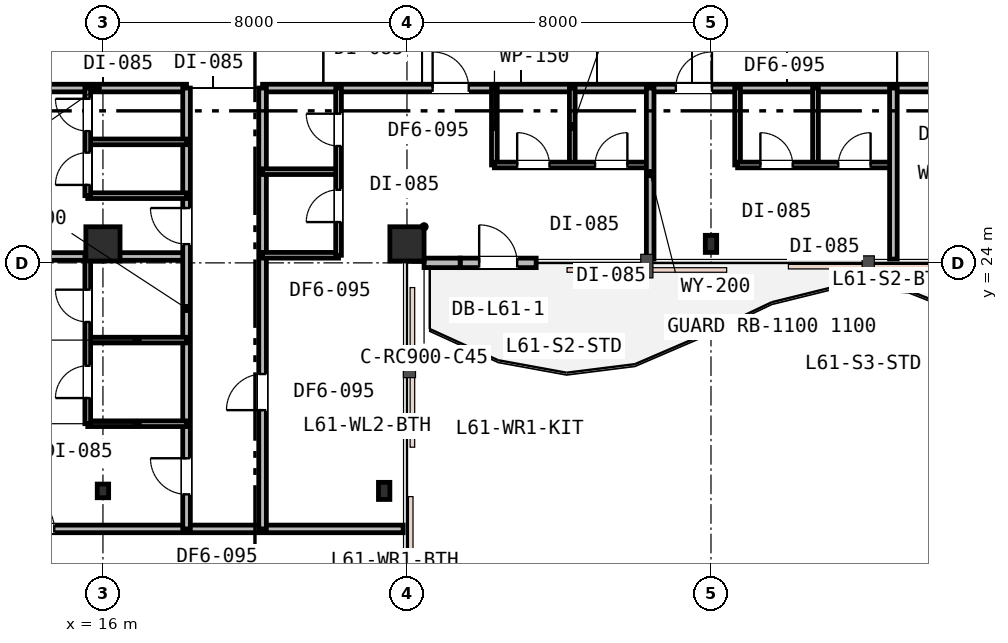
"""IFC4 building model, lengths in metres.
Left out: names, types, materials, properties, quantities, classifications, styles, units other than length and angle.
Written with IfcOpenShell. Run it as: python <this file> out.ifc"""

import sys

from ifc_helpers import new_model, si_unit, direction, frame, frame_2d, origin, origin_2d, place, context, subcontext, project, spatial, rectangle, i_section, extrude, element, fill, save


model = new_model("IFC4")
c1 = context("Model", 3, precision=1e-05, world=origin(), true_north=direction((0.0, 1.0)))
c2 = subcontext(c1, "Body", "Model", "MODEL_VIEW")
j1 = project(units=[si_unit("LENGTHUNIT", "METRE"), si_unit("PLANEANGLEUNIT", "RADIAN")], contexts=[c1])
p1 = place(None, origin())
s1 = spatial("IfcSite", under=j1, at=p1, CompositionType="ELEMENT")
p2 = place(p1, origin())
s2 = spatial("IfcBuilding", under=s1, at=p2, CompositionType="ELEMENT")
p3 = place(p2, frame((0.0, 0.0, 237.4)))
s3 = spatial("IfcBuildingStorey", under=s2, at=p3, CompositionType="ELEMENT", Elevation=237.4)
for number, where, z_axis, x_axis in (
    (1, (16.0, 24.5, 0.0), (0.0, 0.0, 1.0), (1.0, 0.0, 0.0)),
    (2, (24.0, 24.5, 0.0), (0.0, 0.0, 1.0), (1.0, 0.0, 0.0)),
):
    element("IfcColumn", number, at=place(p3, frame(where, z_axis=z_axis, x_axis=x_axis)), inside=s3, PredefinedType="COLUMN", context=c2, shape_type="SweptSolid", body=[
        extrude(rectangle(XDim=0.9, YDim=0.9, at=origin_2d()), origin(), (0.0, 0.0, 1.0), 3.8),
    ])
for number, where, z_axis, x_axis in (
    (3, (32.0, 24.5, 0.0), (0.0, 0.0, 1.0), (1.0, 0.0, 0.0)),
    (4, (23.4, 18.0, 0.0), (0.0, 0.0, 1.0), (1.0, 0.0, 0.0)),
):
    element("IfcColumn", number, at=place(p3, frame(where, z_axis=z_axis, x_axis=x_axis)), inside=s3, PredefinedType="COLUMN", context=c2, shape_type="SweptSolid", body=[
        extrude(i_section(OverallWidth=0.3, OverallDepth=0.45, WebThickness=0.014, FlangeThickness=0.026, FilletRadius=0.027, at=origin_2d()), origin(), (0.0, 0.0, 1.0), 3.8),
    ])
p4 = place(p3, frame((16.0, 18.0, 0.0), z_axis=(0.0, 0.0, 1.0), x_axis=(1.0, 0.0, 0.0)))
e5 = element("IfcColumn", 5, at=p4, inside=s3, PredefinedType="COLUMN", context=c2, shape_type="SweptSolid", body=[
    extrude(i_section(OverallWidth=0.3, OverallDepth=0.36, WebThickness=0.013, FlangeThickness=0.022, FilletRadius=0.027, at=origin_2d()), origin(), (0.0, 0.0, 1.0), 3.8),
])
p5 = place(p3, frame((25.4, 24.0, 0.0), z_axis=(0.0, 0.0, 1.0), x_axis=(1.0, 0.0, 0.0)))
e6 = element("IfcWall", 6, at=p5, inside=s3, PredefinedType="STANDARD", context=c2, shape_type="SweptSolid", body=[
    extrude(rectangle(XDim=2.0, YDim=0.25, at=frame_2d((1.0, 0.0))), origin(), (0.0, 0.0, 1.0), 3.24),
])
p6 = place(p5, frame((0.5, 0.0, 0.0)))
e7 = element("IfcOpeningElement", 7, at=p6, cuts=e6, PredefinedType="OPENING", context=c2, shape_type="SweptSolid", body=[
    extrude(rectangle(XDim=1.0, YDim=2.15, at=frame_2d((0.5, 1.075))), frame((0.0, 0.135, 0.0), z_axis=(0.0, -1.0, 0.0), x_axis=(1.0, 0.0, 0.0)), (0.0, 0.0, 1.0), 0.27),
])
p7 = place(p3, frame((24.45, 24.0, 0.0), z_axis=(0.0, 0.0, 1.0), x_axis=(1.0, 0.0, 0.0)))
e8 = element("IfcWall", 8, at=p7, inside=s3, PredefinedType="STANDARD", context=c2, shape_type="SweptSolid", body=[
    extrude(rectangle(XDim=0.95, YDim=0.25, at=frame_2d((0.475, 0.0))), origin(), (0.0, 0.0, 1.0), 3.24),
])
p8 = place(p3, frame((13.5, 28.6, 0.0), z_axis=(0.0, 0.0, 1.0), x_axis=(1.0, 0.0, 0.0)))
e9 = element("IfcWall", 9, at=p8, inside=s3, PredefinedType="PARTITIONING", context=c2, shape_type="SweptSolid", body=[
    extrude(rectangle(XDim=4.7, YDim=0.2, at=frame_2d((2.35, 0.0))), origin(), (0.0, 0.0, 1.0), 2.92),
])
p9 = place(p3, frame((20.2, 28.6, 0.0), z_axis=(0.0, 0.0, 1.0), x_axis=(1.0, 0.0, 0.0)))
e10 = element("IfcWall", 10, at=p9, inside=s3, PredefinedType="PARTITIONING", context=c2, shape_type="SweptSolid", body=[
    extrude(rectangle(XDim=25.7, YDim=0.2, at=frame_2d((12.85, 0.0))), origin(), (0.0, 0.0, 1.0), 2.92),
])
p10 = place(p9, frame((4.475, 0.0, 0.0)))
e11 = element("IfcOpeningElement", 11, at=p10, cuts=e10, PredefinedType="OPENING", context=c2, shape_type="SweptSolid", body=[
    extrude(rectangle(XDim=0.95, YDim=2.15, at=frame_2d((0.475, 1.075))), frame((0.0, 0.11, 0.0), z_axis=(0.0, -1.0, 0.0), x_axis=(1.0, 0.0, 0.0)), (0.0, 0.0, 1.0), 0.22),
])
p11 = place(p9, frame((10.875, 0.0, 0.0)))
e12 = element("IfcOpeningElement", 12, at=p11, cuts=e10, PredefinedType="OPENING", context=c2, shape_type="SweptSolid", body=[
    extrude(rectangle(XDim=0.95, YDim=2.15, at=frame_2d((0.475, 1.075))), frame((0.0, 0.11, 0.0), z_axis=(0.0, -1.0, 0.0), x_axis=(1.0, 0.0, 0.0)), (0.0, 0.0, 1.0), 0.22),
])
p12 = place(p9, frame((17.854, 0.0, 0.0)))
e13 = element("IfcOpeningElement", 13, at=p12, cuts=e10, PredefinedType="OPENING", context=c2, shape_type="SweptSolid", body=[
    extrude(rectangle(XDim=0.95, YDim=2.15, at=frame_2d((0.475, 1.075))), frame((0.0, 0.11, 0.0), z_axis=(0.0, -1.0, 0.0), x_axis=(1.0, 0.0, 0.0)), (0.0, 0.0, 1.0), 0.22),
])
p13 = place(p3, frame((26.3, 26.576, 0.0), z_axis=(0.0, 0.0, 1.0), x_axis=(0.0, 1.0, 0.0)))
e14 = element("IfcWall", 14, at=p13, inside=s3, PredefinedType="PARTITIONING", context=c2, shape_type="SweptSolid", body=[
    extrude(rectangle(XDim=2.024, YDim=0.15, at=frame_2d((1.012, 0.0))), origin(), (0.0, 0.0, 1.0), 3.22),
])
p14 = place(p3, frame((28.35, 26.576, 0.0), z_axis=(0.0, 0.0, 1.0), x_axis=(0.0, 1.0, 0.0)))
e15 = element("IfcWall", 15, at=p14, inside=s3, PredefinedType="PARTITIONING", context=c2, shape_type="SweptSolid", body=[
    extrude(rectangle(XDim=2.024, YDim=0.15, at=frame_2d((1.012, 0.0))), origin(), (0.0, 0.0, 1.0), 3.53),
])
p15 = place(p3, frame((26.3, 26.576, 0.0), z_axis=(0.0, 0.0, 1.0), x_axis=(1.0, 0.0, 0.0)))
e16 = element("IfcWall", 16, at=p15, inside=s3, PredefinedType="PARTITIONING", context=c2, shape_type="SweptSolid", body=[
    extrude(rectangle(XDim=4.1, YDim=0.15, at=frame_2d((2.05, 0.0))), origin(), (0.0, 0.0, 1.0), 3.22),
])
p16 = place(p15, frame((0.6, 0.0, 0.0)))
e17 = element("IfcOpeningElement", 17, at=p16, cuts=e16, PredefinedType="OPENING", context=c2, shape_type="SweptSolid", body=[
    extrude(rectangle(XDim=0.85, YDim=2.15, at=frame_2d((0.425, 1.075))), frame((0.0, 0.085, 0.0), z_axis=(0.0, -1.0, 0.0), x_axis=(1.0, 0.0, 0.0)), (0.0, 0.0, 1.0), 0.17),
])
p17 = place(p15, frame((2.65, 0.0, 0.0)))
e18 = element("IfcOpeningElement", 18, at=p17, cuts=e16, PredefinedType="OPENING", context=c2, shape_type="SweptSolid", body=[
    extrude(rectangle(XDim=0.85, YDim=2.15, at=frame_2d((0.425, 1.075))), frame((0.0, 0.085, 0.0), z_axis=(0.0, -1.0, 0.0), x_axis=(1.0, 0.0, 0.0)), (0.0, 0.0, 1.0), 0.17),
])
p18 = place(p3, frame((30.4, 24.1, 0.0), z_axis=(0.0, 0.0, 1.0), x_axis=(0.0, 1.0, 0.0)))
e19 = element("IfcWall", 19, at=p18, inside=s3, PredefinedType="PARTITIONING", context=c2, shape_type="SweptSolid", body=[
    extrude(rectangle(XDim=4.5, YDim=0.2, at=frame_2d((2.25, 0.0))), origin(), (0.0, 0.0, 1.0), 3.24),
])
p19 = place(p3, frame((32.7, 26.576, 0.0), z_axis=(0.0, 0.0, 1.0), x_axis=(0.0, 1.0, 0.0)))
e20 = element("IfcWall", 20, at=p19, inside=s3, PredefinedType="PARTITIONING", context=c2, shape_type="SweptSolid", body=[
    extrude(rectangle(XDim=2.024, YDim=0.15, at=frame_2d((1.012, 0.0))), origin(), (0.0, 0.0, 1.0), 3.53),
])
p20 = place(p3, frame((34.75, 26.576, 0.0), z_axis=(0.0, 0.0, 1.0), x_axis=(0.0, 1.0, 0.0)))
e21 = element("IfcWall", 21, at=p20, inside=s3, PredefinedType="PARTITIONING", context=c2, shape_type="SweptSolid", body=[
    extrude(rectangle(XDim=2.024, YDim=0.15, at=frame_2d((1.012, 0.0))), origin(), (0.0, 0.0, 1.0), 3.22),
])
p21 = place(p3, frame((32.7, 26.576, 0.0), z_axis=(0.0, 0.0, 1.0), x_axis=(1.0, 0.0, 0.0)))
e22 = element("IfcWall", 22, at=p21, inside=s3, PredefinedType="PARTITIONING", context=c2, shape_type="SweptSolid", body=[
    extrude(rectangle(XDim=4.1, YDim=0.15, at=frame_2d((2.05, 0.0))), origin(), (0.0, 0.0, 1.0), 3.22),
])
p22 = place(p21, frame((0.6, 0.0, 0.0)))
e23 = element("IfcOpeningElement", 23, at=p22, cuts=e22, PredefinedType="OPENING", context=c2, shape_type="SweptSolid", body=[
    extrude(rectangle(XDim=0.85, YDim=2.15, at=frame_2d((0.425, 1.075))), frame((0.0, 0.085, 0.0), z_axis=(0.0, -1.0, 0.0), x_axis=(1.0, 0.0, 0.0)), (0.0, 0.0, 1.0), 0.17),
])
p23 = place(p21, frame((2.65, 0.0, 0.0)))
e24 = element("IfcOpeningElement", 24, at=p23, cuts=e22, PredefinedType="OPENING", context=c2, shape_type="SweptSolid", body=[
    extrude(rectangle(XDim=0.85, YDim=2.15, at=frame_2d((0.425, 1.075))), frame((0.0, 0.085, 0.0), z_axis=(0.0, -1.0, 0.0), x_axis=(1.0, 0.0, 0.0)), (0.0, 0.0, 1.0), 0.17),
])
p24 = place(p3, frame((36.8, 24.1, 0.0), z_axis=(0.0, 0.0, 1.0), x_axis=(0.0, 1.0, 0.0)))
e25 = element("IfcWall", 25, at=p24, inside=s3, PredefinedType="PARTITIONING", context=c2, shape_type="SweptSolid", body=[
    extrude(rectangle(XDim=4.5, YDim=0.2, at=frame_2d((2.25, 0.0))), origin(), (0.0, 0.0, 1.0), 3.22),
])
p25 = place(p3, frame((5.1, 17.0, 0.0), z_axis=(0.0, 0.0, 1.0), x_axis=(1.0, 0.0, 0.0)))
e26 = element("IfcWall", 26, at=p25, inside=s3, PredefinedType="PARTITIONING", context=c2, shape_type="SweptSolid", body=[
    extrude(rectangle(XDim=18.8, YDim=0.2, at=frame_2d((9.4, 0.0))), origin(), (0.0, 0.0, 1.0), 2.92),
])
p26 = place(p25, frame((8.668, 0.0, 0.0)))
e27 = element("IfcOpeningElement", 27, at=p26, cuts=e26, PredefinedType="OPENING", context=c2, shape_type="SweptSolid", body=[
    extrude(rectangle(XDim=0.95, YDim=2.15, at=frame_2d((0.475, 1.075))), frame((0.0, 0.11, 0.0), z_axis=(0.0, -1.0, 0.0), x_axis=(1.0, 0.0, 0.0)), (0.0, 0.0, 1.0), 0.22),
])
p27 = place(p3, frame((5.1, 24.168, 0.0), z_axis=(0.0, 0.0, 1.0), x_axis=(1.0, 0.0, 0.0)))
e28 = element("IfcWall", 28, at=p27, inside=s3, PredefinedType="PARTITIONING", context=c2, shape_type="SweptSolid", body=[
    extrude(rectangle(XDim=13.1, YDim=0.2, at=frame_2d((6.55, 0.0))), origin(), (0.0, 0.0, 1.0), 2.92),
])
p28 = place(p3, frame((18.2, 17.0, 0.0), z_axis=(0.0, 0.0, 1.0), x_axis=(0.0, 1.0, 0.0)))
e29 = element("IfcWall", 29, at=p28, inside=s3, PredefinedType="PARTITIONING", context=c2, shape_type="SweptSolid", body=[
    extrude(rectangle(XDim=11.6, YDim=0.2, at=frame_2d((5.8, 0.0))), origin(), (0.0, 0.0, 1.0), 2.92),
])
p29 = place(p28, frame((7.493, 0.0, 0.0)))
e30 = element("IfcOpeningElement", 30, at=p29, cuts=e29, PredefinedType="OPENING", context=c2, shape_type="SweptSolid", body=[
    extrude(rectangle(XDim=0.95, YDim=2.15, at=frame_2d((0.475, 1.075))), frame((0.0, 0.11, 0.0), z_axis=(0.0, -1.0, 0.0), x_axis=(1.0, 0.0, 0.0)), (0.0, 0.0, 1.0), 0.22),
])
p30 = place(p28, frame((0.909, 0.0, 0.0)))
e31 = element("IfcOpeningElement", 31, at=p30, cuts=e29, PredefinedType="OPENING", context=c2, shape_type="SweptSolid", body=[
    extrude(rectangle(XDim=0.95, YDim=2.15, at=frame_2d((0.475, 1.075))), frame((0.0, 0.11, 0.0), z_axis=(0.0, -1.0, 0.0), x_axis=(1.0, 0.0, 0.0)), (0.0, 0.0, 1.0), 0.22),
])
for number, where, z_axis, x_axis in (
    (32, (15.6, 25.768, 0.0), (0.0, 0.0, 1.0), (1.0, 0.0, 0.0)),
    (33, (15.6, 27.184, 0.0), (0.0, 0.0, 1.0), (1.0, 0.0, 0.0)),
):
    element("IfcWall", number, at=place(p3, frame(where, z_axis=z_axis, x_axis=x_axis)), inside=s3, PredefinedType="PARTITIONING", context=c2, shape_type="SweptSolid", body=[
        extrude(rectangle(XDim=2.6, YDim=0.15, at=frame_2d((1.3, 0.0))), origin(), (0.0, 0.0, 1.0), 2.92),
    ])
p31 = place(p3, frame((15.6, 25.768, 0.0), z_axis=(0.0, 0.0, 1.0), x_axis=(0.0, 1.0, 0.0)))
e34 = element("IfcWall", 34, at=p31, inside=s3, PredefinedType="PARTITIONING", context=c2, shape_type="SweptSolid", body=[
    extrude(rectangle(XDim=2.832, YDim=0.15, at=frame_2d((1.416, 0.0))), origin(), (0.0, 0.0, 1.0), 2.92),
])
p32 = place(p31, frame((0.283, 0.0, 0.0)))
e35 = element("IfcOpeningElement", 35, at=p32, cuts=e34, PredefinedType="OPENING", context=c2, shape_type="SweptSolid", body=[
    extrude(rectangle(XDim=0.85, YDim=2.15, at=frame_2d((0.425, 1.075))), frame((0.0, 0.085, 0.0), z_axis=(0.0, -1.0, 0.0), x_axis=(1.0, 0.0, 0.0)), (0.0, 0.0, 1.0), 0.17),
])
p33 = place(p31, frame((1.699, 0.0, 0.0)))
e36 = element("IfcOpeningElement", 36, at=p33, cuts=e34, PredefinedType="OPENING", context=c2, shape_type="SweptSolid", body=[
    extrude(rectangle(XDim=0.85, YDim=2.15, at=frame_2d((0.425, 1.075))), frame((0.0, 0.085, 0.0), z_axis=(0.0, -1.0, 0.0), x_axis=(1.0, 0.0, 0.0)), (0.0, 0.0, 1.0), 0.17),
])
for number, where, z_axis, x_axis in (
    (37, (15.6, 19.768, 0.0), (0.0, 0.0, 1.0), (1.0, 0.0, 0.0)),
    (38, (15.6, 21.968, 0.0), (0.0, 0.0, 1.0), (1.0, 0.0, 0.0)),
):
    element("IfcWall", number, at=place(p3, frame(where, z_axis=z_axis, x_axis=x_axis)), inside=s3, PredefinedType="PARTITIONING", context=c2, shape_type="SweptSolid", body=[
        extrude(rectangle(XDim=2.6, YDim=0.15, at=frame_2d((1.3, 0.0))), origin(), (0.0, 0.0, 1.0), 2.92),
    ])
p34 = place(p3, frame((15.6, 19.768, 0.0), z_axis=(0.0, 0.0, 1.0), x_axis=(0.0, 1.0, 0.0)))
e39 = element("IfcWall", 39, at=p34, inside=s3, PredefinedType="PARTITIONING", context=c2, shape_type="SweptSolid", body=[
    extrude(rectangle(XDim=4.4, YDim=0.15, at=frame_2d((2.2, 0.0))), origin(), (0.0, 0.0, 1.0), 2.92),
])
p35 = place(p34, frame((0.675, 0.0, 0.0)))
e40 = element("IfcOpeningElement", 40, at=p35, cuts=e39, PredefinedType="OPENING", context=c2, shape_type="SweptSolid", body=[
    extrude(rectangle(XDim=0.85, YDim=2.15, at=frame_2d((0.425, 1.075))), frame((0.0, 0.085, 0.0), z_axis=(0.0, -1.0, 0.0), x_axis=(1.0, 0.0, 0.0)), (0.0, 0.0, 1.0), 0.17),
])
p36 = place(p34, frame((2.677, 0.0, 0.0)))
e41 = element("IfcOpeningElement", 41, at=p36, cuts=e39, PredefinedType="OPENING", context=c2, shape_type="SweptSolid", body=[
    extrude(rectangle(XDim=0.85, YDim=2.15, at=frame_2d((0.425, 1.075))), frame((0.0, 0.085, 0.0), z_axis=(0.0, -1.0, 0.0), x_axis=(1.0, 0.0, 0.0)), (0.0, 0.0, 1.0), 0.17),
])
p37 = place(p3, frame((20.2, 17.0, 0.0), z_axis=(0.0, 0.0, 1.0), x_axis=(0.0, 1.0, 0.0)))
e42 = element("IfcWall", 42, at=p37, inside=s3, PredefinedType="PARTITIONING", context=c2, shape_type="SweptSolid", body=[
    extrude(rectangle(XDim=11.6, YDim=0.2, at=frame_2d((5.8, 0.0))), origin(), (0.0, 0.0, 1.0), 2.92),
])
p38 = place(p37, frame((3.125, 0.0, 0.0)))
e43 = element("IfcOpeningElement", 43, at=p38, cuts=e42, PredefinedType="OPENING", context=c2, shape_type="SweptSolid", body=[
    extrude(rectangle(XDim=0.95, YDim=2.15, at=frame_2d((0.475, 1.075))), frame((0.0, 0.11, 0.0), z_axis=(0.0, -1.0, 0.0), x_axis=(1.0, 0.0, 0.0)), (0.0, 0.0, 1.0), 0.22),
])
p39 = place(p3, frame((20.2, 24.2, 0.0), z_axis=(0.0, 0.0, 1.0), x_axis=(1.0, 0.0, 0.0)))
e44 = element("IfcWall", 44, at=p39, inside=s3, PredefinedType="PARTITIONING", context=c2, shape_type="SweptSolid", body=[
    extrude(rectangle(XDim=2.0, YDim=0.15, at=frame_2d((1.0, 0.0))), origin(), (0.0, 0.0, 1.0), 2.92),
])
p40 = place(p3, frame((20.2, 26.4, 0.0), z_axis=(0.0, 0.0, 1.0), x_axis=(1.0, 0.0, 0.0)))
e45 = element("IfcWall", 45, at=p40, inside=s3, PredefinedType="PARTITIONING", context=c2, shape_type="SweptSolid", body=[
    extrude(rectangle(XDim=2.0, YDim=0.15, at=frame_2d((1.0, 0.0))), origin(), (0.0, 0.0, 1.0), 3.22),
])
p41 = place(p3, frame((22.2, 24.2, 0.0), z_axis=(0.0, 0.0, 1.0), x_axis=(0.0, 1.0, 0.0)))
e46 = element("IfcWall", 46, at=p41, inside=s3, PredefinedType="PARTITIONING", context=c2, shape_type="SweptSolid", body=[
    extrude(rectangle(XDim=4.4, YDim=0.15, at=frame_2d((2.2, 0.0))), origin(), (0.0, 0.0, 1.0), 2.92),
])
p42 = place(p41, frame((0.873, 0.0, 0.0)))
e47 = element("IfcOpeningElement", 47, at=p42, cuts=e46, PredefinedType="OPENING", context=c2, shape_type="SweptSolid", body=[
    extrude(rectangle(XDim=0.85, YDim=2.15, at=frame_2d((0.425, 1.075))), frame((0.0, 0.085, 0.0), z_axis=(0.0, -1.0, 0.0), x_axis=(1.0, 0.0, 0.0)), (0.0, 0.0, 1.0), 0.17),
])
p43 = place(p41, frame((2.875, 0.0, 0.0)))
e48 = element("IfcOpeningElement", 48, at=p43, cuts=e46, PredefinedType="OPENING", context=c2, shape_type="SweptSolid", body=[
    extrude(rectangle(XDim=0.85, YDim=2.15, at=frame_2d((0.425, 1.075))), frame((0.0, 0.085, 0.0), z_axis=(0.0, -1.0, 0.0), x_axis=(1.0, 0.0, 0.0)), (0.0, 0.0, 1.0), 0.17),
])
p44 = place(p6, origin())
e49 = element("IfcDoor", 49, at=p44, inside=s3, OperationType="SINGLE_SWING_LEFT", PredefinedType="DOOR", context=c2, shape_type="SweptSolid", body=[
    extrude(rectangle(XDim=1.0, YDim=2.15, at=frame_2d((0.5, 1.075))), frame((0.0, 0.025, 0.0), z_axis=(0.0, -1.0, 0.0), x_axis=(1.0, 0.0, 0.0)), (0.0, 0.0, 1.0), 0.05),
])
fill(e7, e49)
p45 = place(p10, origin())
e50 = element("IfcDoor", 50, at=p45, inside=s3, OperationType="SINGLE_SWING_LEFT", PredefinedType="DOOR", context=c2, shape_type="SweptSolid", body=[
    extrude(rectangle(XDim=0.95, YDim=2.15, at=frame_2d((0.475, 1.075))), frame((0.0, 0.025, 0.0), z_axis=(0.0, -1.0, 0.0), x_axis=(1.0, 0.0, 0.0)), (0.0, 0.0, 1.0), 0.05),
])
fill(e11, e50)
p46 = place(p16, origin())
e51 = element("IfcDoor", 51, at=p46, inside=s3, OperationType="SINGLE_SWING_LEFT", PredefinedType="DOOR", context=c2, shape_type="SweptSolid", body=[
    extrude(rectangle(XDim=0.85, YDim=2.15, at=frame_2d((0.425, 1.075))), frame((0.0, 0.025, 0.0), z_axis=(0.0, -1.0, 0.0), x_axis=(1.0, 0.0, 0.0)), (0.0, 0.0, 1.0), 0.05),
])
fill(e17, e51)
p47 = place(p17, origin())
e52 = element("IfcDoor", 52, at=p47, inside=s3, OperationType="SINGLE_SWING_RIGHT", PredefinedType="DOOR", context=c2, shape_type="SweptSolid", body=[
    extrude(rectangle(XDim=0.85, YDim=2.15, at=frame_2d((0.425, 1.075))), frame((0.0, 0.025, 0.0), z_axis=(0.0, -1.0, 0.0), x_axis=(1.0, 0.0, 0.0)), (0.0, 0.0, 1.0), 0.05),
])
fill(e18, e52)
p48 = place(p11, origin())
e53 = element("IfcDoor", 53, at=p48, inside=s3, OperationType="SINGLE_SWING_RIGHT", PredefinedType="DOOR", context=c2, shape_type="SweptSolid", body=[
    extrude(rectangle(XDim=0.95, YDim=2.15, at=frame_2d((0.475, 1.075))), frame((0.0, 0.025, 0.0), z_axis=(0.0, -1.0, 0.0), x_axis=(1.0, 0.0, 0.0)), (0.0, 0.0, 1.0), 0.05),
])
fill(e12, e53)
p49 = place(p22, origin())
e54 = element("IfcDoor", 54, at=p49, inside=s3, OperationType="SINGLE_SWING_LEFT", PredefinedType="DOOR", context=c2, shape_type="SweptSolid", body=[
    extrude(rectangle(XDim=0.85, YDim=2.15, at=frame_2d((0.425, 1.075))), frame((0.0, 0.025, 0.0), z_axis=(0.0, -1.0, 0.0), x_axis=(1.0, 0.0, 0.0)), (0.0, 0.0, 1.0), 0.05),
])
fill(e23, e54)
p50 = place(p23, origin())
e55 = element("IfcDoor", 55, at=p50, inside=s3, OperationType="SINGLE_SWING_RIGHT", PredefinedType="DOOR", context=c2, shape_type="SweptSolid", body=[
    extrude(rectangle(XDim=0.85, YDim=2.15, at=frame_2d((0.425, 1.075))), frame((0.0, 0.025, 0.0), z_axis=(0.0, -1.0, 0.0), x_axis=(1.0, 0.0, 0.0)), (0.0, 0.0, 1.0), 0.05),
])
fill(e24, e55)
p51 = place(p29, origin())
e56 = element("IfcDoor", 56, at=p51, inside=s3, OperationType="SINGLE_SWING_RIGHT", PredefinedType="DOOR", context=c2, shape_type="SweptSolid", body=[
    extrude(rectangle(XDim=0.95, YDim=2.15, at=frame_2d((0.475, 1.075))), frame((0.0, 0.025, 0.0), z_axis=(0.0, -1.0, 0.0), x_axis=(1.0, 0.0, 0.0)), (0.0, 0.0, 1.0), 0.05),
])
fill(e30, e56)
p52 = place(p32, origin())
e57 = element("IfcDoor", 57, at=p52, inside=s3, OperationType="SINGLE_SWING_LEFT", PredefinedType="DOOR", context=c2, shape_type="SweptSolid", body=[
    extrude(rectangle(XDim=0.85, YDim=2.15, at=frame_2d((0.425, 1.075))), frame((0.0, 0.025, 0.0), z_axis=(0.0, -1.0, 0.0), x_axis=(1.0, 0.0, 0.0)), (0.0, 0.0, 1.0), 0.05),
])
fill(e35, e57)
p53 = place(p33, origin())
e58 = element("IfcDoor", 58, at=p53, inside=s3, OperationType="SINGLE_SWING_RIGHT", PredefinedType="DOOR", context=c2, shape_type="SweptSolid", body=[
    extrude(rectangle(XDim=0.85, YDim=2.15, at=frame_2d((0.425, 1.075))), frame((0.0, 0.025, 0.0), z_axis=(0.0, -1.0, 0.0), x_axis=(1.0, 0.0, 0.0)), (0.0, 0.0, 1.0), 0.05),
])
fill(e36, e58)
p54 = place(p30, origin())
e59 = element("IfcDoor", 59, at=p54, inside=s3, OperationType="SINGLE_SWING_RIGHT", PredefinedType="DOOR", context=c2, shape_type="SweptSolid", body=[
    extrude(rectangle(XDim=0.95, YDim=2.15, at=frame_2d((0.475, 1.075))), frame((0.0, 0.025, 0.0), z_axis=(0.0, -1.0, 0.0), x_axis=(1.0, 0.0, 0.0)), (0.0, 0.0, 1.0), 0.05),
])
fill(e31, e59)
p55 = place(p35, origin())
e60 = element("IfcDoor", 60, at=p55, inside=s3, OperationType="SINGLE_SWING_LEFT", PredefinedType="DOOR", context=c2, shape_type="SweptSolid", body=[
    extrude(rectangle(XDim=0.85, YDim=2.15, at=frame_2d((0.425, 1.075))), frame((0.0, 0.025, 0.0), z_axis=(0.0, -1.0, 0.0), x_axis=(1.0, 0.0, 0.0)), (0.0, 0.0, 1.0), 0.05),
])
fill(e40, e60)
p56 = place(p36, origin())
e61 = element("IfcDoor", 61, at=p56, inside=s3, OperationType="SINGLE_SWING_RIGHT", PredefinedType="DOOR", context=c2, shape_type="SweptSolid", body=[
    extrude(rectangle(XDim=0.85, YDim=2.15, at=frame_2d((0.425, 1.075))), frame((0.0, 0.025, 0.0), z_axis=(0.0, -1.0, 0.0), x_axis=(1.0, 0.0, 0.0)), (0.0, 0.0, 1.0), 0.05),
])
fill(e41, e61)
p57 = place(p38, origin())
e62 = element("IfcDoor", 62, at=p57, inside=s3, OperationType="SINGLE_SWING_LEFT", PredefinedType="DOOR", context=c2, shape_type="SweptSolid", body=[
    extrude(rectangle(XDim=0.95, YDim=2.15, at=frame_2d((0.475, 1.075))), frame((0.0, 0.025, 0.0), z_axis=(0.0, -1.0, 0.0), x_axis=(1.0, 0.0, 0.0)), (0.0, 0.0, 1.0), 0.05),
])
fill(e43, e62)
p58 = place(p42, origin())
e63 = element("IfcDoor", 63, at=p58, inside=s3, OperationType="SINGLE_SWING_LEFT", PredefinedType="DOOR", context=c2, shape_type="SweptSolid", body=[
    extrude(rectangle(XDim=0.85, YDim=2.15, at=frame_2d((0.425, 1.075))), frame((0.0, 0.025, 0.0), z_axis=(0.0, -1.0, 0.0), x_axis=(1.0, 0.0, 0.0)), (0.0, 0.0, 1.0), 0.05),
])
fill(e47, e63)
p59 = place(p43, origin())
e64 = element("IfcDoor", 64, at=p59, inside=s3, OperationType="SINGLE_SWING_RIGHT", PredefinedType="DOOR", context=c2, shape_type="SweptSolid", body=[
    extrude(rectangle(XDim=0.85, YDim=2.15, at=frame_2d((0.425, 1.075))), frame((0.0, 0.025, 0.0), z_axis=(0.0, -1.0, 0.0), x_axis=(1.0, 0.0, 0.0)), (0.0, 0.0, 1.0), 0.05),
])
fill(e48, e64)
p60 = place(p26, origin())
e65 = element("IfcDoor", 65, at=p60, inside=s3, OperationType="SINGLE_SWING_LEFT", PredefinedType="DOOR", context=c2, shape_type="SweptSolid", body=[
    extrude(rectangle(XDim=0.95, YDim=2.15, at=frame_2d((0.475, 1.075))), frame((0.0, 0.025, 0.0), z_axis=(0.0, -1.0, 0.0), x_axis=(1.0, 0.0, 0.0)), (0.0, 0.0, 1.0), 0.05),
])
fill(e27, e65)
save(model, sys.argv[1])
